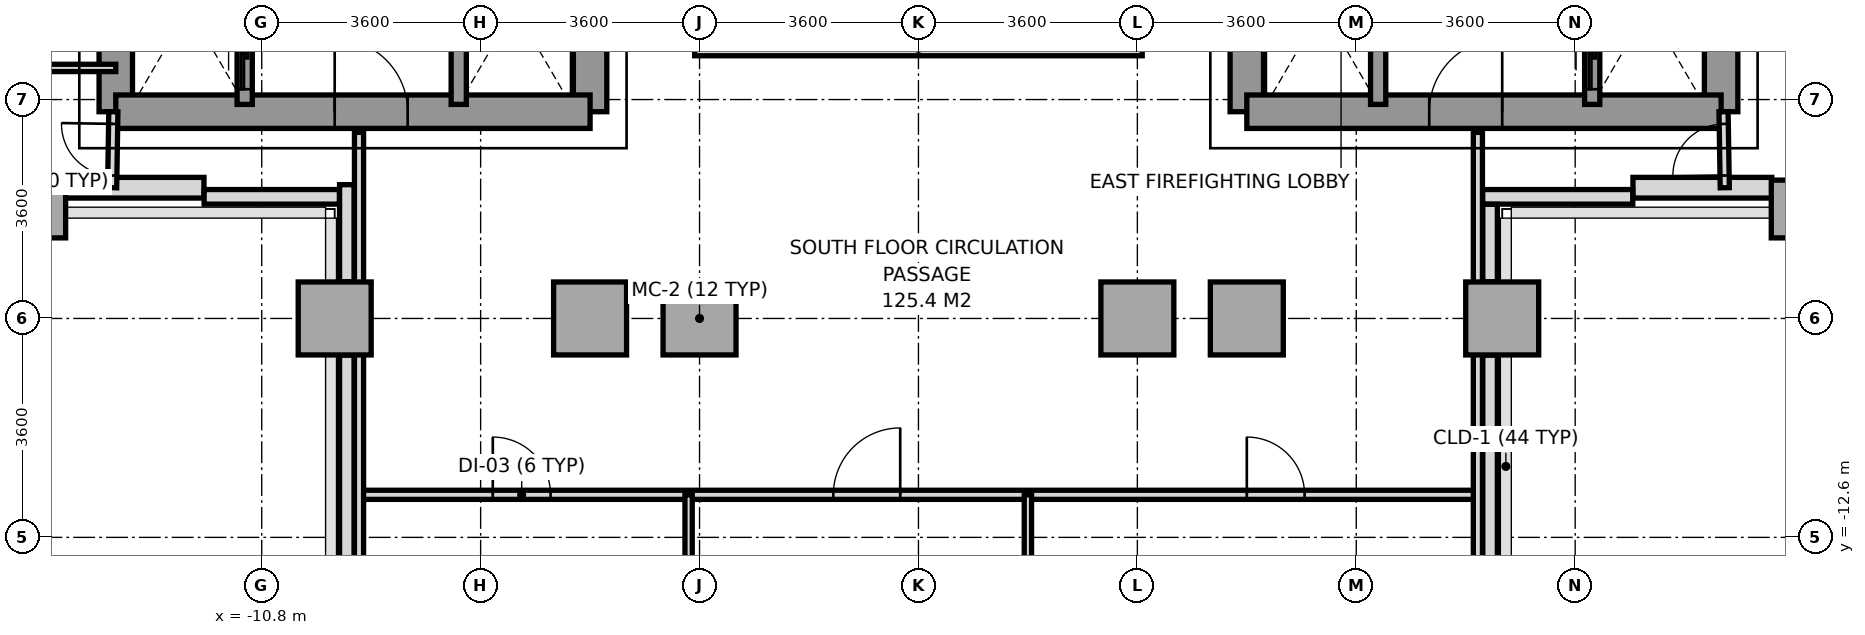
"""IFC4 building model, lengths in metres.
Left out: names, types, materials, properties, quantities, classifications, styles, units other than length and angle.
Written with IfcOpenShell. Run it as: python <this file> out.ifc"""

import sys

from ifc_helpers import new_model, si_unit, direction, frame, frame_2d, origin, origin_2d, place, context, subcontext, project, spatial, rectangle, extrude, source, transform, mapped, element, fill, save


model = new_model("IFC4")
c1 = context("Model", 3, precision=1e-05, world=origin(), true_north=direction((0.0, 1.0)))
c2 = subcontext(c1, "Body", "Model", "MODEL_VIEW")
j1 = project(units=[si_unit("LENGTHUNIT", "METRE"), si_unit("PLANEANGLEUNIT", "RADIAN")], contexts=[c1])
p1 = place(None, origin())
s1 = spatial("IfcSite", under=j1, at=p1, CompositionType="ELEMENT")
p2 = place(p1, origin())
s2 = spatial("IfcBuilding", under=s1, at=p2, CompositionType="ELEMENT")
p3 = place(p2, frame((0.0, 0.0, 54.4)))
s3 = spatial("IfcBuildingStorey", under=s2, at=p3, CompositionType="ELEMENT", Elevation=54.4)
m1 = source(origin(), c2, "Body", "SweptSolid", [
    extrude(rectangle(XDim=0.75, YDim=0.95, at=origin_2d()), origin(), (0.0, 0.0, 1.0), 3.2),
])
p4 = place(p3, frame((-14.4, -7.2, 0.0), z_axis=(0.0, 0.0, 1.0), x_axis=(1.0, 0.0, 0.0)))
e1 = element("IfcColumn", 1, at=p4, inside=s3, PredefinedType="COLUMN", context=c2, shape_type="MappedRepresentation", body=[
    mapped(m1, transform((0.0, 0.0, 0.0), x_axis=(1.0, 0.0, 0.0), y_axis=(0.0, 1.0, 0.0), z_axis=(0.0, 0.0, 1.0), scale=1.0)),
])
m2 = source(origin(), c2, "Body", "SweptSolid", [
    extrude(rectangle(XDim=1.2, YDim=1.2, at=origin_2d()), origin(), (0.0, 0.0, 1.0), 3.2),
])
for number, where, z_axis, x_axis in (
    (2, (-9.6, -9.0, 0.0), (0.0, 0.0, 1.0), (1.0, 0.0, 0.0)),
    (3, (-5.4, -9.0, 0.0), (0.0, 0.0, 1.0), (1.0, 0.0, 0.0)),
    (4, (-3.6, -9.0, 0.0), (0.0, 0.0, 1.0), (1.0, 0.0, 0.0)),
    (5, (3.6, -9.0, 0.0), (0.0, 0.0, 1.0), (1.0, 0.0, 0.0)),
    (6, (5.4, -9.0, 0.0), (0.0, 0.0, 1.0), (1.0, 0.0, 0.0)),
    (7, (9.6, -9.0, 0.0), (0.0, 0.0, 1.0), (1.0, 0.0, 0.0)),
):
    element("IfcColumn", number, at=place(p3, frame(where, z_axis=z_axis, x_axis=x_axis)), inside=s3, PredefinedType="COLUMN", context=c2, shape_type="MappedRepresentation", body=[
        mapped(m2, transform((0.0, 0.0, 0.0), x_axis=(1.0, 0.0, 0.0), y_axis=(0.0, 1.0, 0.0), z_axis=(0.0, 0.0, 1.0), scale=1.0)),
    ])
p5 = place(p3, frame((14.4, -7.2, 0.0), z_axis=(0.0, 0.0, 1.0), x_axis=(1.0, 0.0, 0.0)))
e8 = element("IfcColumn", 8, at=p5, inside=s3, PredefinedType="COLUMN", context=c2, shape_type="MappedRepresentation", body=[
    mapped(m1, transform((0.0, 0.0, 0.0), x_axis=(1.0, 0.0, 0.0), y_axis=(0.0, 1.0, 0.0), z_axis=(0.0, 0.0, 1.0), scale=1.0)),
])
for number, where, z_axis, x_axis in (
    (9, (-14.033, -6.85, 0.0), (0.0, 0.0, 1.0), (1.0, 0.0, 0.0)),
    (10, (11.75, -6.85, 0.0), (0.0, 0.0, 1.0), (1.0, 0.0, 0.0)),
):
    element("IfcWall", number, at=place(p3, frame(where, z_axis=z_axis, x_axis=x_axis)), inside=s3, PredefinedType="SOLIDWALL", context=c2, shape_type="SweptSolid", body=[
        extrude(rectangle(XDim=2.283, YDim=0.34, at=frame_2d((1.142, 0.0))), origin(), (0.0, 0.0, 1.0), 3.2),
    ])
p6 = place(p3, frame((11.747, -7.0, 0.0), z_axis=(0.0, 0.0, 1.0), x_axis=(-1.0, 0.0, 0.0)))
e11 = element("IfcWall", 11, at=p6, inside=s3, PredefinedType="PARAPET", context=c2, shape_type="SweptSolid", body=[
    extrude(rectangle(XDim=2.469, YDim=0.24, at=frame_2d((1.234, 0.0))), origin(), (0.0, 0.0, 1.0), 1.15),
])
p7 = place(p3, frame((9.4, -7.123, 0.0), z_axis=(0.0, 0.0, 1.0), x_axis=(0.0, -1.0, 0.0)))
e12 = element("IfcWall", 12, at=p7, inside=s3, PredefinedType="PARAPET", context=c2, shape_type="SweptSolid", body=[
    extrude(rectangle(XDim=1.274, YDim=0.24, at=frame_2d((0.637, 0.0))), origin(), (0.0, 0.0, 1.0), 1.15),
])
p8 = place(p3, frame((9.4, -9.603, 0.0), z_axis=(0.0, 0.0, 1.0), x_axis=(0.0, -1.0, 0.0)))
e13 = element("IfcWall", 13, at=p8, inside=s3, PredefinedType="PARAPET", context=c2, shape_type="SweptSolid", body=[
    extrude(rectangle(XDim=6.0, YDim=0.24, at=frame_2d((3.0, 0.0))), origin(), (0.0, 0.0, 1.0), 1.15),
])
p9 = place(p3, frame((-9.4, -15.358, 0.0), z_axis=(0.0, 0.0, 1.0), x_axis=(0.0, 1.0, 0.0)))
e14 = element("IfcWall", 14, at=p9, inside=s3, PredefinedType="PARAPET", context=c2, shape_type="SweptSolid", body=[
    extrude(rectangle(XDim=5.755, YDim=0.24, at=frame_2d((2.877, 0.0))), origin(), (0.0, 0.0, 1.0), 1.15),
])
p10 = place(p3, frame((-9.4, -8.397, 0.0), z_axis=(0.0, 0.0, 1.0), x_axis=(0.0, 1.0, 0.0)))
e15 = element("IfcWall", 15, at=p10, inside=s3, PredefinedType="PARAPET", context=c2, shape_type="SweptSolid", body=[
    extrude(rectangle(XDim=1.597, YDim=0.24, at=frame_2d((0.798, 0.0))), origin(), (0.0, 0.0, 1.0), 1.15),
])
p11 = place(p3, frame((-9.523, -7.0, 0.0), z_axis=(0.0, 0.0, 1.0), x_axis=(-1.0, 0.0, 0.0)))
e16 = element("IfcWall", 16, at=p11, inside=s3, PredefinedType="PARAPET", context=c2, shape_type="SweptSolid", body=[
    extrude(rectangle(XDim=2.224, YDim=0.24, at=frame_2d((1.112, 0.0))), origin(), (0.0, 0.0, 1.0), 1.15),
])
p12 = place(p3, frame((-13.2, -5.6, 0.0), z_axis=(0.0, 0.0, 1.0), x_axis=(0.0, 1.0, 0.0)))
e17 = element("IfcWall", 17, at=p12, inside=s3, PredefinedType="SHEAR", context=c2, shape_type="SweptSolid", body=[
    extrude(rectangle(XDim=11.2, YDim=0.55, at=frame_2d((5.6, 0.0))), origin(), (0.0, 0.0, 1.0), 3.2),
])
p13 = place(p3, frame((-5.4, -5.6, 0.0), z_axis=(0.0, 0.0, 1.0), x_axis=(0.0, 1.0, 0.0)))
e18 = element("IfcWall", 18, at=p13, inside=s3, PredefinedType="SHEAR", context=c2, shape_type="SweptSolid", body=[
    extrude(rectangle(XDim=12.5, YDim=0.55, at=frame_2d((6.25, 0.0))), origin(), (0.0, 0.0, 1.0), 3.2),
])
p14 = place(p13, frame((4.55, 0.0, 0.0)))
e19 = element("IfcOpeningElement", 19, at=p14, cuts=e18, PredefinedType="OPENING", context=c2, shape_type="SweptSolid", body=[
    extrude(rectangle(XDim=1.2, YDim=2.2, at=frame_2d((0.6, 1.1))), frame((0.0, 0.285, 0.0), z_axis=(0.0, -1.0, 0.0), x_axis=(1.0, 0.0, 0.0)), (0.0, 0.0, 1.0), 0.57),
])
p15 = place(p13, frame((6.86, 0.0, 0.0)))
e20 = element("IfcOpeningElement", 20, at=p15, cuts=e18, PredefinedType="OPENING", context=c2, shape_type="SweptSolid", body=[
    extrude(rectangle(XDim=0.8, YDim=2.1, at=frame_2d((0.4, 1.05))), frame((0.0, 0.285, 0.0), z_axis=(0.0, -1.0, 0.0), x_axis=(1.0, 0.0, 0.0)), (0.0, 0.0, 1.0), 0.57),
])
p16 = place(p3, frame((-13.2, -5.6, 0.0), z_axis=(0.0, 0.0, 1.0), x_axis=(1.0, 0.0, 0.0)))
e21 = element("IfcWall", 21, at=p16, inside=s3, PredefinedType="SHEAR", context=c2, shape_type="SweptSolid", body=[
    extrude(rectangle(XDim=7.8, YDim=0.55, at=frame_2d((3.9, 0.0))), origin(), (0.0, 0.0, 1.0), 3.2),
])
p17 = place(p16, frame((3.6, 0.0, 0.0)))
e22 = element("IfcOpeningElement", 22, at=p17, cuts=e21, PredefinedType="OPENING", context=c2, shape_type="SweptSolid", body=[
    extrude(rectangle(XDim=1.2, YDim=2.2, at=frame_2d((0.6, 1.1))), frame((0.0, 0.285, 0.0), z_axis=(0.0, -1.0, 0.0), x_axis=(1.0, 0.0, 0.0)), (0.0, 0.0, 1.0), 0.57),
])
p18 = place(p3, frame((13.2, -5.6, 0.0), z_axis=(0.0, 0.0, 1.0), x_axis=(0.0, 1.0, 0.0)))
e23 = element("IfcWall", 23, at=p18, inside=s3, PredefinedType="SHEAR", context=c2, shape_type="SweptSolid", body=[
    extrude(rectangle(XDim=11.2, YDim=0.55, at=frame_2d((5.6, 0.0))), origin(), (0.0, 0.0, 1.0), 3.2),
])
p19 = place(p3, frame((5.4, -5.6, 0.0), z_axis=(0.0, 0.0, 1.0), x_axis=(0.0, 1.0, 0.0)))
e24 = element("IfcWall", 24, at=p19, inside=s3, PredefinedType="SHEAR", context=c2, shape_type="SweptSolid", body=[
    extrude(rectangle(XDim=12.5, YDim=0.55, at=frame_2d((6.25, 0.0))), origin(), (0.0, 0.0, 1.0), 3.2),
])
p20 = place(p19, frame((4.55, 0.0, 0.0)))
e25 = element("IfcOpeningElement", 25, at=p20, cuts=e24, PredefinedType="OPENING", context=c2, shape_type="SweptSolid", body=[
    extrude(rectangle(XDim=1.2, YDim=2.2, at=frame_2d((0.6, 1.1))), frame((0.0, 0.285, 0.0), z_axis=(0.0, -1.0, 0.0), x_axis=(1.0, 0.0, 0.0)), (0.0, 0.0, 1.0), 0.57),
])
p21 = place(p19, frame((6.86, 0.0, 0.0)))
e26 = element("IfcOpeningElement", 26, at=p21, cuts=e24, PredefinedType="OPENING", context=c2, shape_type="SweptSolid", body=[
    extrude(rectangle(XDim=0.8, YDim=2.1, at=frame_2d((0.4, 1.05))), frame((0.0, 0.285, 0.0), z_axis=(0.0, -1.0, 0.0), x_axis=(1.0, 0.0, 0.0)), (0.0, 0.0, 1.0), 0.57),
])
p22 = place(p19, frame((7.88, 0.0, 0.0)))
e27 = element("IfcOpeningElement", 27, at=p22, cuts=e24, PredefinedType="OPENING", context=c2, shape_type="SweptSolid", body=[
    extrude(rectangle(XDim=0.8, YDim=2.1, at=frame_2d((0.4, 1.05))), frame((0.0, 0.285, 0.0), z_axis=(0.0, -1.0, 0.0), x_axis=(1.0, 0.0, 0.0)), (0.0, 0.0, 1.0), 0.57),
])
p23 = place(p3, frame((5.4, -5.6, 0.0), z_axis=(0.0, 0.0, 1.0), x_axis=(1.0, 0.0, 0.0)))
e28 = element("IfcWall", 28, at=p23, inside=s3, PredefinedType="SHEAR", context=c2, shape_type="SweptSolid", body=[
    extrude(rectangle(XDim=7.8, YDim=0.55, at=frame_2d((3.9, 0.0))), origin(), (0.0, 0.0, 1.0), 3.2),
])
p24 = place(p23, frame((3.0, 0.0, 0.0)))
e29 = element("IfcOpeningElement", 29, at=p24, cuts=e28, PredefinedType="OPENING", context=c2, shape_type="SweptSolid", body=[
    extrude(rectangle(XDim=1.2, YDim=2.2, at=frame_2d((0.6, 1.1))), frame((0.0, 0.285, 0.0), z_axis=(0.0, -1.0, 0.0), x_axis=(1.0, 0.0, 0.0)), (0.0, 0.0, 1.0), 0.57),
])
p25 = place(p3, frame((-11.08, -5.48, 0.0), z_axis=(0.0, 0.0, 1.0), x_axis=(0.0, 1.0, 0.0)))
e30 = element("IfcWall", 30, at=p25, inside=s3, PredefinedType="SOLIDWALL", context=c2, shape_type="SweptSolid", body=[
    extrude(rectangle(XDim=1.6, YDim=0.25, at=frame_2d((0.8, 0.0))), origin(), (0.0, 0.0, 1.0), 3.2),
])
p26 = place(p25, frame((0.25, 0.0, 0.0)))
e31 = element("IfcOpeningElement", 31, at=p26, cuts=e30, PredefinedType="OPENING", context=c2, shape_type="SweptSolid", body=[
    extrude(rectangle(XDim=1.1, YDim=2.2, at=frame_2d((0.55, 1.1))), frame((0.0, 0.135, 0.0), z_axis=(0.0, -1.0, 0.0), x_axis=(1.0, 0.0, 0.0)), (0.0, 0.0, 1.0), 0.27),
])
p27 = place(p3, frame((11.08, -5.48, 0.0), z_axis=(0.0, 0.0, 1.0), x_axis=(0.0, 1.0, 0.0)))
e32 = element("IfcWall", 32, at=p27, inside=s3, PredefinedType="SOLIDWALL", context=c2, shape_type="SweptSolid", body=[
    extrude(rectangle(XDim=1.6, YDim=0.25, at=frame_2d((0.8, 0.0))), origin(), (0.0, 0.0, 1.0), 3.2),
])
p28 = place(p27, frame((0.25, 0.0, 0.0)))
e33 = element("IfcOpeningElement", 33, at=p28, cuts=e32, PredefinedType="OPENING", context=c2, shape_type="SweptSolid", body=[
    extrude(rectangle(XDim=1.1, YDim=2.2, at=frame_2d((0.55, 1.1))), frame((0.0, 0.135, 0.0), z_axis=(0.0, -1.0, 0.0), x_axis=(1.0, 0.0, 0.0)), (0.0, 0.0, 1.0), 0.27),
])
for number, where, z_axis, x_axis in (
    (34, (-7.56, -5.48, 0.0), (0.0, 0.0, 1.0), (0.0, 1.0, 0.0)),
    (35, (7.56, -5.48, 0.0), (0.0, 0.0, 1.0), (0.0, 1.0, 0.0)),
):
    element("IfcWall", number, at=place(p3, frame(where, z_axis=z_axis, x_axis=x_axis)), inside=s3, PredefinedType="SOLIDWALL", context=c2, shape_type="SweptSolid", body=[
        extrude(rectangle(XDim=1.6, YDim=0.25, at=frame_2d((0.8, 0.0))), origin(), (0.0, 0.0, 1.0), 3.2),
    ])
p29 = place(p3, frame((-9.2, -11.9, 0.0), z_axis=(0.0, 0.0, 1.0), x_axis=(1.0, 0.0, 0.0)))
e36 = element("IfcWall", 36, at=p29, inside=s3, PredefinedType="PARTITIONING", context=c2, shape_type="SweptSolid", body=[
    extrude(rectangle(XDim=18.4, YDim=0.15, at=frame_2d((9.2, 0.0))), origin(), (0.0, 0.0, 1.0), 3.2),
])
p30 = place(p29, frame((2.2, 0.0, 0.0)))
e37 = element("IfcOpeningElement", 37, at=p30, cuts=e36, PredefinedType="OPENING", context=c2, shape_type="SweptSolid", body=[
    extrude(rectangle(XDim=0.95, YDim=2.15, at=frame_2d((0.475, 1.075))), frame((0.0, 0.085, 0.0), z_axis=(0.0, -1.0, 0.0), x_axis=(1.0, 0.0, 0.0)), (0.0, 0.0, 1.0), 0.17),
])
p31 = place(p29, frame((7.8, 0.0, 0.0)))
e38 = element("IfcOpeningElement", 38, at=p31, cuts=e36, PredefinedType="OPENING", context=c2, shape_type="SweptSolid", body=[
    extrude(rectangle(XDim=1.1, YDim=2.2, at=frame_2d((0.55, 1.1))), frame((0.0, 0.085, 0.0), z_axis=(0.0, -1.0, 0.0), x_axis=(1.0, 0.0, 0.0)), (0.0, 0.0, 1.0), 0.17),
])
p32 = place(p29, frame((14.6, 0.0, 0.0)))
e39 = element("IfcOpeningElement", 39, at=p32, cuts=e36, PredefinedType="OPENING", context=c2, shape_type="SweptSolid", body=[
    extrude(rectangle(XDim=0.95, YDim=2.15, at=frame_2d((0.475, 1.075))), frame((0.0, 0.085, 0.0), z_axis=(0.0, -1.0, 0.0), x_axis=(1.0, 0.0, 0.0)), (0.0, 0.0, 1.0), 0.17),
])
for number, where, z_axis, x_axis in (
    (40, (-9.2, -15.68, 0.0), (0.0, 0.0, 1.0), (0.0, 1.0, 0.0)),
    (41, (9.2, -15.68, 0.0), (0.0, 0.0, 1.0), (0.0, 1.0, 0.0)),
):
    element("IfcWall", number, at=place(p3, frame(where, z_axis=z_axis, x_axis=x_axis)), inside=s3, PredefinedType="PARTITIONING", context=c2, shape_type="SweptSolid", body=[
        extrude(rectangle(XDim=9.74, YDim=0.15, at=frame_2d((4.87, 0.0))), origin(), (0.0, 0.0, 1.0), 2.71),
    ])
for number, where, z_axis, x_axis in (
    (42, (-3.78, -24.65, 0.0), (0.0, 0.0, 1.0), (0.0, 1.0, 0.0)),
    (43, (1.8, -24.65, 0.0), (0.0, 0.0, 1.0), (0.0, 1.0, 0.0)),
):
    element("IfcWall", number, at=place(p3, frame(where, z_axis=z_axis, x_axis=x_axis)), inside=s3, PredefinedType="PARTITIONING", context=c2, shape_type="SweptSolid", body=[
        extrude(rectangle(XDim=12.75, YDim=0.12, at=frame_2d((6.375, 0.0))), origin(), (0.0, 0.0, 1.0), 2.71),
    ])
p33 = place(p3, frame((-13.26, -6.85, 0.0), z_axis=(0.0, 0.0, 1.0), x_axis=(0.016013571389, 0.999871774545, 0.0)))
e44 = element("IfcWall", 44, at=p33, inside=s3, PredefinedType="PARTITIONING", context=c2, shape_type="SweptSolid", body=[
    extrude(rectangle(XDim=1.25, YDim=0.15, at=frame_2d((0.625, 0.0))), origin(), (0.0, 0.0, 1.0), 3.2),
])
p34 = place(p33, frame((0.2, 0.0, 0.0)))
e45 = element("IfcOpeningElement", 45, at=p34, cuts=e44, PredefinedType="OPENING", context=c2, shape_type="SweptSolid", body=[
    extrude(rectangle(XDim=0.85, YDim=2.1, at=frame_2d((0.425, 1.05))), frame((0.0, 0.085, 0.0), z_axis=(0.0, -1.0, 0.0), x_axis=(1.0, 0.0, 0.0)), (0.0, 0.0, 1.0), 0.17),
])
p35 = place(p3, frame((-24.57, -4.88, 0.0), z_axis=(0.0, 0.0, 1.0), x_axis=(1.0, 0.0, 0.0)))
e46 = element("IfcWall", 46, at=p35, inside=s3, PredefinedType="PARTITIONING", context=c2, shape_type="SweptSolid", body=[
    extrude(rectangle(XDim=11.37, YDim=0.12, at=frame_2d((5.685, 0.0))), origin(), (0.0, 0.0, 1.0), 2.7),
])
p36 = place(p35, frame((2.2, 0.0, 0.0)))
e47 = element("IfcOpeningElement", 47, at=p36, cuts=e46, PredefinedType="OPENING", context=c2, shape_type="SweptSolid", body=[
    extrude(rectangle(XDim=0.95, YDim=2.15, at=frame_2d((0.475, 1.075))), frame((0.0, 0.07, 0.0), z_axis=(0.0, -1.0, 0.0), x_axis=(1.0, 0.0, 0.0)), (0.0, 0.0, 1.0), 0.14),
])
p37 = place(p3, frame((13.26, -6.85, 0.0), z_axis=(0.0, 0.0, 1.0), x_axis=(-0.016013571389, 0.999871774545, 0.0)))
e48 = element("IfcWall", 48, at=p37, inside=s3, PredefinedType="PARTITIONING", context=c2, shape_type="SweptSolid", body=[
    extrude(rectangle(XDim=1.25, YDim=0.15, at=frame_2d((0.625, 0.0))), origin(), (0.0, 0.0, 1.0), 3.2),
])
p38 = place(p37, frame((0.2, 0.0, 0.0)))
e49 = element("IfcOpeningElement", 49, at=p38, cuts=e48, PredefinedType="OPENING", context=c2, shape_type="SweptSolid", body=[
    extrude(rectangle(XDim=0.85, YDim=2.1, at=frame_2d((0.425, 1.05))), frame((0.0, 0.085, 0.0), z_axis=(0.0, -1.0, 0.0), x_axis=(1.0, 0.0, 0.0)), (0.0, 0.0, 1.0), 0.17),
])
p39 = place(p3, frame((-3.68, -4.56, 0.0), z_axis=(0.0, 0.0, 1.0), x_axis=(1.0, 0.0, 0.0)))
e50 = element("IfcWall", 50, at=p39, inside=s3, PredefinedType="PARAPET", context=c2, shape_type="SweptSolid", body=[
    extrude(rectangle(XDim=7.36, YDim=0.24, at=frame_2d((3.68, 0.0))), origin(), (0.0, 0.0, 1.0), 1.15),
])
m3 = source(origin(), c2, "Body", "SweptSolid", [
    extrude(rectangle(XDim=1.2, YDim=2.2, at=frame_2d((0.6, 1.1))), frame((0.0, 0.025, 0.0), z_axis=(0.0, -1.0, 0.0), x_axis=(1.0, 0.0, 0.0)), (0.0, 0.0, 1.0), 0.05),
])
p40 = place(p17, origin())
e51 = element("IfcDoor", 51, at=p40, inside=s3, OperationType="SINGLE_SWING_LEFT", PredefinedType="DOOR", context=c2, shape_type="MappedRepresentation", body=[
    mapped(m3, transform((0.0, 0.0, 0.0), x_axis=(1.0, 0.0, 0.0), y_axis=(0.0, 1.0, 0.0), z_axis=(0.0, 0.0, 1.0), scale=1.0)),
])
fill(e22, e51)
p41 = place(p24, origin())
e52 = element("IfcDoor", 52, at=p41, inside=s3, OperationType="SINGLE_SWING_RIGHT", PredefinedType="DOOR", context=c2, shape_type="MappedRepresentation", body=[
    mapped(m3, transform((0.0, 0.0, 0.0), x_axis=(1.0, 0.0, 0.0), y_axis=(0.0, 1.0, 0.0), z_axis=(0.0, 0.0, 1.0), scale=1.0)),
])
fill(e29, e52)
m4 = source(origin(), c2, "Body", "SweptSolid", [
    extrude(rectangle(XDim=1.1, YDim=2.2, at=frame_2d((0.55, 1.1))), frame((0.0, 0.025, 0.0), z_axis=(0.0, -1.0, 0.0), x_axis=(1.0, 0.0, 0.0)), (0.0, 0.0, 1.0), 0.05),
])
p42 = place(p26, origin())
e53 = element("IfcDoor", 53, at=p42, inside=s3, OperationType="SLIDING_TO_LEFT", PredefinedType="DOOR", context=c2, shape_type="MappedRepresentation", body=[
    mapped(m4, transform((0.0, 0.0, 0.0), x_axis=(1.0, 0.0, 0.0), y_axis=(0.0, 1.0, 0.0), z_axis=(0.0, 0.0, 1.0), scale=1.0)),
])
fill(e31, e53)
p43 = place(p28, origin())
e54 = element("IfcDoor", 54, at=p43, inside=s3, OperationType="SLIDING_TO_LEFT", PredefinedType="DOOR", context=c2, shape_type="MappedRepresentation", body=[
    mapped(m4, transform((0.0, 0.0, 0.0), x_axis=(1.0, 0.0, 0.0), y_axis=(0.0, 1.0, 0.0), z_axis=(0.0, 0.0, 1.0), scale=1.0)),
])
fill(e33, e54)
m5 = source(origin(), c2, "Body", "SweptSolid", [
    extrude(rectangle(XDim=0.95, YDim=2.15, at=frame_2d((0.475, 1.075))), frame((0.0, 0.025, 0.0), z_axis=(0.0, -1.0, 0.0), x_axis=(1.0, 0.0, 0.0)), (0.0, 0.0, 1.0), 0.05),
])
p44 = place(p30, origin())
e55 = element("IfcDoor", 55, at=p44, inside=s3, OperationType="SINGLE_SWING_LEFT", PredefinedType="DOOR", context=c2, shape_type="MappedRepresentation", body=[
    mapped(m5, transform((0.0, 0.0, 0.0), x_axis=(1.0, 0.0, 0.0), y_axis=(0.0, 1.0, 0.0), z_axis=(0.0, 0.0, 1.0), scale=1.0)),
])
fill(e37, e55)
p45 = place(p31, origin())
e56 = element("IfcDoor", 56, at=p45, inside=s3, OperationType="SINGLE_SWING_RIGHT", PredefinedType="DOOR", context=c2, shape_type="MappedRepresentation", body=[
    mapped(m4, transform((0.0, 0.0, 0.0), x_axis=(1.0, 0.0, 0.0), y_axis=(0.0, 1.0, 0.0), z_axis=(0.0, 0.0, 1.0), scale=1.0)),
])
fill(e38, e56)
p46 = place(p32, origin())
e57 = element("IfcDoor", 57, at=p46, inside=s3, OperationType="SINGLE_SWING_LEFT", PredefinedType="DOOR", context=c2, shape_type="MappedRepresentation", body=[
    mapped(m5, transform((0.0, 0.0, 0.0), x_axis=(1.0, 0.0, 0.0), y_axis=(0.0, 1.0, 0.0), z_axis=(0.0, 0.0, 1.0), scale=1.0)),
])
fill(e39, e57)
m6 = source(origin(), c2, "Body", "SweptSolid", [
    extrude(rectangle(XDim=0.85, YDim=2.1, at=frame_2d((0.425, 1.05))), frame((0.0, 0.025, 0.0), z_axis=(0.0, -1.0, 0.0), x_axis=(1.0, 0.0, 0.0)), (0.0, 0.0, 1.0), 0.05),
])
p47 = place(p34, origin())
e58 = element("IfcDoor", 58, at=p47, inside=s3, OperationType="SINGLE_SWING_RIGHT", PredefinedType="DOOR", context=c2, shape_type="MappedRepresentation", body=[
    mapped(m6, transform((0.0, 0.0, 0.0), x_axis=(1.0, 0.0, 0.0), y_axis=(0.0, 1.0, 0.0), z_axis=(0.0, 0.0, 1.0), scale=1.0)),
])
fill(e45, e58)
p48 = place(p38, origin())
e59 = element("IfcDoor", 59, at=p48, inside=s3, OperationType="SINGLE_SWING_LEFT", PredefinedType="DOOR", context=c2, shape_type="MappedRepresentation", body=[
    mapped(m6, transform((0.0, 0.0, 0.0), x_axis=(1.0, 0.0, 0.0), y_axis=(0.0, 1.0, 0.0), z_axis=(0.0, 0.0, 1.0), scale=1.0)),
])
fill(e49, e59)
save(model, sys.argv[1])
